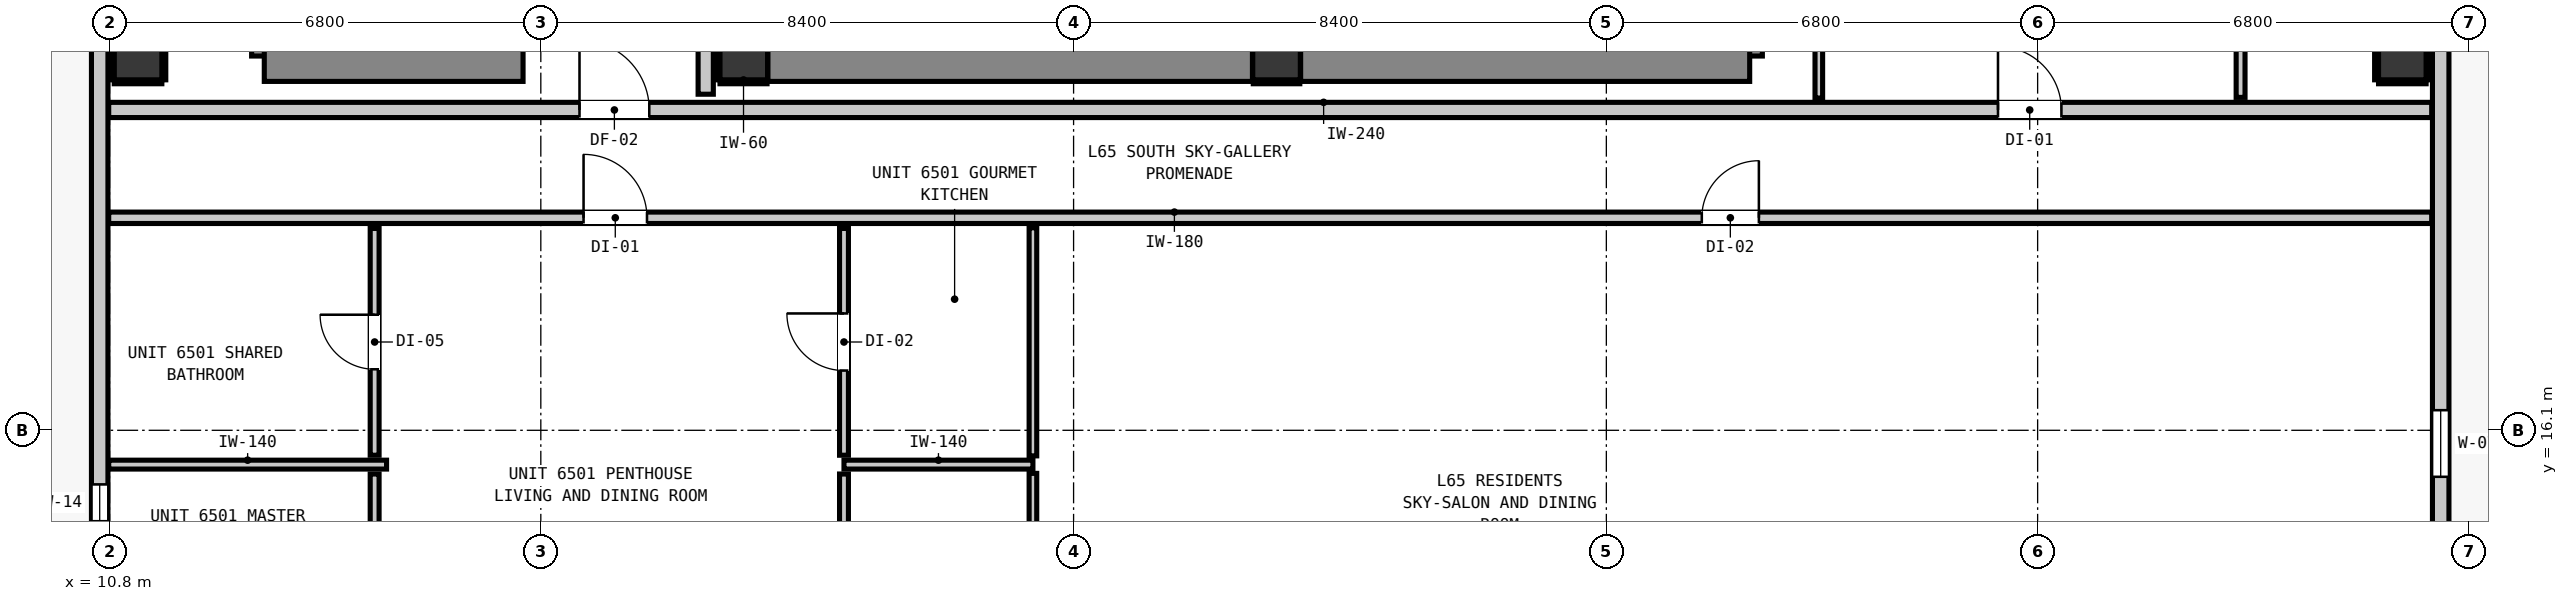
"""IFC4 building model, lengths in metres.
Left out: names, types, materials, properties, quantities, classifications, styles, units other than length and angle.
Written with IfcOpenShell. Run it as: python <this file> out.ifc"""

import sys

from ifc_helpers import new_model, si_unit, direction, frame, frame_2d, origin, origin_2d, place, context, subcontext, project, spatial, rectangle, extrude, element, fill, save


model = new_model("IFC4")
c1 = context("Model", 3, precision=1e-05, world=origin(), true_north=direction((0.0, 1.0)))
c2 = subcontext(c1, "Body", "Model", "MODEL_VIEW")
j1 = project(units=[si_unit("LENGTHUNIT", "METRE"), si_unit("PLANEANGLEUNIT", "RADIAN")], contexts=[c1])
p1 = place(None, origin())
s1 = spatial("IfcSite", under=j1, at=p1, CompositionType="ELEMENT")
p2 = place(p1, origin())
s2 = spatial("IfcBuilding", under=s1, at=p2, CompositionType="ELEMENT")
p3 = place(p2, frame((0.0, 0.0, 223.36)))
s3 = spatial("IfcBuildingStorey", under=s2, at=p3, CompositionType="ELEMENT", Elevation=223.36)
for number, where, z_axis, x_axis in (
    (1, (20.8, 22.0, 0.0), (0.0, 0.0, 1.0), (1.0, 0.0, 0.0)),
    (2, (29.2, 22.0, 0.0), (0.0, 0.0, 1.0), (1.0, 0.0, 0.0)),
):
    element("IfcColumn", number, at=place(p3, frame(where, z_axis=z_axis, x_axis=x_axis)), inside=s3, PredefinedType="COLUMN", context=c2, shape_type="SweptSolid", body=[
        extrude(rectangle(XDim=0.75, YDim=0.75, at=origin_2d()), origin(), (0.0, 0.0, 1.0), 3.32),
    ])
p4 = place(p3, frame((13.44, 22.0, 0.0), z_axis=(0.0, 0.0, 1.0), x_axis=(0.0, 1.0, 0.0)))
e3 = element("IfcWall", 3, at=p4, inside=s3, PredefinedType="SHEAR", context=c2, shape_type="SweptSolid", body=[
    extrude(rectangle(XDim=8.32, YDim=0.8, at=frame_2d((4.16, 0.0))), origin(), (0.0, 0.0, 1.0), 3.32),
])
p5 = place(p3, frame((13.24, 22.0, 0.0), z_axis=(0.0, 0.0, 1.0), x_axis=(1.0, 0.0, 0.0)))
e4 = element("IfcWall", 4, at=p5, inside=s3, PredefinedType="SHEAR", context=c2, shape_type="SweptSolid", body=[
    extrude(rectangle(XDim=4.08, YDim=0.8, at=frame_2d((2.04, 0.0))), origin(), (0.0, 0.0, 1.0), 3.32),
])
p6 = place(p3, frame((36.46, 22.0, 0.0), z_axis=(0.0, 0.0, 1.0), x_axis=(0.0, 1.0, 0.0)))
e5 = element("IfcWall", 5, at=p6, inside=s3, PredefinedType="SHEAR", context=c2, shape_type="SweptSolid", body=[
    extrude(rectangle(XDim=8.32, YDim=0.8, at=frame_2d((4.16, 0.0))), origin(), (0.0, 0.0, 1.0), 3.32),
])
p7 = place(p3, frame((29.58, 22.0, 0.0), z_axis=(0.0, 0.0, 1.0), x_axis=(1.0, 0.0, 0.0)))
e6 = element("IfcWall", 6, at=p7, inside=s3, PredefinedType="SHEAR", context=c2, shape_type="SweptSolid", body=[
    extrude(rectangle(XDim=7.08, YDim=0.8, at=frame_2d((3.54, 0.0))), origin(), (0.0, 0.0, 1.0), 3.32),
])
p8 = place(p3, frame((21.18, 22.0, 0.0), z_axis=(0.0, 0.0, 1.0), x_axis=(1.0, 0.0, 0.0)))
e7 = element("IfcWall", 7, at=p8, inside=s3, PredefinedType="SHEAR", context=c2, shape_type="SweptSolid", body=[
    extrude(rectangle(XDim=7.64, YDim=0.8, at=frame_2d((3.82, 0.0))), origin(), (0.0, 0.0, 1.0), 3.32),
])
for number, where, z_axis, x_axis in (
    (8, (11.25, 22.0, 0.0), (0.0, 0.0, 1.0), (1.0, 0.0, 0.0)),
    (9, (46.95, 22.0, 0.0), (0.0, 0.0, 1.0), (1.0, 0.0, 0.0)),
):
    element("IfcColumn", number, at=place(p3, frame(where, z_axis=z_axis, x_axis=x_axis)), inside=s3, PredefinedType="COLUMN", context=c2, shape_type="SweptSolid", body=[
        extrude(rectangle(XDim=0.75, YDim=0.75, at=origin_2d()), origin(), (0.0, 0.0, 1.0), 3.32),
    ])
p9 = place(p3, frame((10.645, 12.345, 0.0), z_axis=(0.0, 0.0, 1.0), x_axis=(0.0, 1.0, 0.0)))
e10 = element("IfcWall", 10, at=p9, inside=s3, PredefinedType="STANDARD", context=c2, shape_type="SweptSolid", body=[
    extrude(rectangle(XDim=30.31, YDim=0.26, at=frame_2d((15.155, 0.0))), origin(), (0.0, 0.0, 1.0), 2.92),
])
p10 = place(p9, frame((0.91, 0.0, 0.0)))
e11 = element("IfcOpeningElement", 11, at=p10, cuts=e10, PredefinedType="OPENING", context=c2, shape_type="SweptSolid", body=[
    extrude(rectangle(XDim=1.0, YDim=2.15, at=frame_2d((0.5, 1.075))), frame((0.0, 0.14, 0.0), z_axis=(0.0, -1.0, 0.0), x_axis=(1.0, 0.0, 0.0)), (0.0, 0.0, 1.0), 0.28),
])
p11 = place(p9, frame((2.322, 0.0, 0.85)))
e12 = element("IfcOpeningElement", 12, at=p11, cuts=e10, PredefinedType="OPENING", context=c2, shape_type="SweptSolid", body=[
    extrude(rectangle(XDim=0.58, YDim=1.5, at=frame_2d((0.29, 0.75))), frame((0.0, 0.14, 0.0), z_axis=(0.0, -1.0, 0.0), x_axis=(1.0, 0.0, 0.0)), (0.0, 0.0, 1.0), 0.28),
])
p12 = place(p3, frame((47.555, 42.655, 0.0), z_axis=(0.0, 0.0, 1.0), x_axis=(0.0, -1.0, 0.0)))
e13 = element("IfcWall", 13, at=p12, inside=s3, PredefinedType="STANDARD", context=c2, shape_type="SweptSolid", body=[
    extrude(rectangle(XDim=30.31, YDim=0.26, at=frame_2d((15.155, 0.0))), origin(), (0.0, 0.0, 1.0), 2.92),
])
p13 = place(p12, frame((4.082, 0.0, 0.0)))
e14 = element("IfcOpeningElement", 14, at=p13, cuts=e13, PredefinedType="OPENING", context=c2, shape_type="SweptSolid", body=[
    extrude(rectangle(XDim=1.0, YDim=2.15, at=frame_2d((0.5, 1.075))), frame((0.0, 0.14, 0.0), z_axis=(0.0, -1.0, 0.0), x_axis=(1.0, 0.0, 0.0)), (0.0, 0.0, 1.0), 0.28),
])
p14 = place(p12, frame((26.238, 0.0, 0.85)))
e15 = element("IfcOpeningElement", 15, at=p14, cuts=e13, PredefinedType="OPENING", context=c2, shape_type="SweptSolid", body=[
    extrude(rectangle(XDim=1.05, YDim=1.65, at=frame_2d((0.525, 0.825))), frame((0.0, 0.14, 0.0), z_axis=(0.0, -1.0, 0.0), x_axis=(1.0, 0.0, 0.0)), (0.0, 0.0, 1.0), 0.28),
])
p15 = place(p3, frame((10.787, 21.15, 0.0), z_axis=(0.0, 0.0, 1.0), x_axis=(1.0, 0.0, 0.0)))
e16 = element("IfcWall", 16, at=p15, inside=s3, PredefinedType="PARTITIONING", context=c2, shape_type="SweptSolid", body=[
    extrude(rectangle(XDim=36.626, YDim=0.24, at=frame_2d((18.313, 0.0))), origin(), (0.0, 0.0, 1.0), 2.92),
])
p16 = place(p15, frame((7.423, 0.0, 0.0)))
e17 = element("IfcOpeningElement", 17, at=p16, cuts=e16, PredefinedType="OPENING", context=c2, shape_type="SweptSolid", body=[
    extrude(rectangle(XDim=1.1, YDim=2.15, at=frame_2d((0.55, 1.075))), frame((0.0, 0.13, 0.0), z_axis=(0.0, -1.0, 0.0), x_axis=(1.0, 0.0, 0.0)), (0.0, 0.0, 1.0), 0.26),
])
p17 = place(p15, frame((29.788, 0.0, 0.0)))
e18 = element("IfcOpeningElement", 18, at=p17, cuts=e16, PredefinedType="OPENING", context=c2, shape_type="SweptSolid", body=[
    extrude(rectangle(XDim=1.0, YDim=2.15, at=frame_2d((0.5, 1.075))), frame((0.0, 0.13, 0.0), z_axis=(0.0, -1.0, 0.0), x_axis=(1.0, 0.0, 0.0)), (0.0, 0.0, 1.0), 0.26),
])
p18 = place(p3, frame((10.787, 19.45, 0.0), z_axis=(0.0, 0.0, 1.0), x_axis=(1.0, 0.0, 0.0)))
e19 = element("IfcWall", 19, at=p18, inside=s3, PredefinedType="PARTITIONING", context=c2, shape_type="SweptSolid", body=[
    extrude(rectangle(XDim=36.626, YDim=0.18, at=frame_2d((18.313, 0.0))), origin(), (0.0, 0.0, 1.0), 2.92),
])
p19 = place(p18, frame((7.487, 0.0, 0.0)))
e20 = element("IfcOpeningElement", 20, at=p19, cuts=e19, PredefinedType="OPENING", context=c2, shape_type="SweptSolid", body=[
    extrude(rectangle(XDim=1.0, YDim=2.15, at=frame_2d((0.5, 1.075))), frame((0.0, 0.1, 0.0), z_axis=(0.0, -1.0, 0.0), x_axis=(1.0, 0.0, 0.0)), (0.0, 0.0, 1.0), 0.2),
])
p20 = place(p18, frame((25.118, 0.0, 0.0)))
e21 = element("IfcOpeningElement", 21, at=p20, cuts=e19, PredefinedType="OPENING", context=c2, shape_type="SweptSolid", body=[
    extrude(rectangle(XDim=0.9, YDim=2.1, at=frame_2d((0.45, 1.05))), frame((0.0, 0.1, 0.0), z_axis=(0.0, -1.0, 0.0), x_axis=(1.0, 0.0, 0.0)), (0.0, 0.0, 1.0), 0.2),
])
p21 = place(p3, frame((10.787, 15.559, 0.0), z_axis=(0.0, 0.0, 1.0), x_axis=(1.0, 0.0, 0.0)))
e22 = element("IfcWall", 22, at=p21, inside=s3, PredefinedType="PARTITIONING", context=c2, shape_type="SweptSolid", body=[
    extrude(rectangle(XDim=4.381, YDim=0.14, at=frame_2d((2.19, 0.0))), origin(), (0.0, 0.0, 1.0), 2.92),
])
p22 = place(p3, frame((22.38, 15.559, 0.0), z_axis=(0.0, 0.0, 1.0), x_axis=(1.0, 0.0, 0.0)))
e23 = element("IfcWall", 23, at=p22, inside=s3, PredefinedType="PARTITIONING", context=c2, shape_type="SweptSolid", body=[
    extrude(rectangle(XDim=2.979, YDim=0.14, at=frame_2d((1.49, 0.0))), origin(), (0.0, 0.0, 1.0), 2.92),
])
p23 = place(p3, frame((20.2, 21.398, 0.0), z_axis=(0.0, 0.0, 1.0), x_axis=(0.0, 1.0, 0.0)))
e24 = element("IfcWall", 24, at=p23, inside=s3, PredefinedType="PARTITIONING", context=c2, shape_type="SweptSolid", body=[
    extrude(rectangle(XDim=6.754, YDim=0.24, at=frame_2d((3.377, 0.0))), origin(), (0.0, 0.0, 1.0), 2.92),
])
p24 = place(p3, frame((14.98, 10.387, 0.0), z_axis=(0.0, 0.0, 1.0), x_axis=(0.0, 1.0, 0.0)))
e25 = element("IfcWall", 25, at=p24, inside=s3, PredefinedType="PARTITIONING", context=c2, shape_type="SweptSolid", body=[
    extrude(rectangle(XDim=5.024, YDim=0.14, at=frame_2d((2.512, 0.0))), origin(), (0.0, 0.0, 1.0), 2.92),
])
p25 = place(p24, frame((2.155, 0.0, 0.0)))
e26 = element("IfcOpeningElement", 26, at=p25, cuts=e25, PredefinedType="OPENING", context=c2, shape_type="SweptSolid", body=[
    extrude(rectangle(XDim=0.9, YDim=2.1, at=frame_2d((0.45, 1.05))), frame((0.0, 0.08, 0.0), z_axis=(0.0, -1.0, 0.0), x_axis=(1.0, 0.0, 0.0)), (0.0, 0.0, 1.0), 0.16),
])
p26 = place(p3, frame((14.98, 15.707, 0.0), z_axis=(0.0, 0.0, 1.0), x_axis=(0.0, 1.0, 0.0)))
e27 = element("IfcWall", 27, at=p26, inside=s3, PredefinedType="PARTITIONING", context=c2, shape_type="SweptSolid", body=[
    extrude(rectangle(XDim=3.575, YDim=0.14, at=frame_2d((1.788, 0.0))), origin(), (0.0, 0.0, 1.0), 2.92),
])
p27 = place(p26, frame((1.355, 0.0, 0.0)))
e28 = element("IfcOpeningElement", 28, at=p27, cuts=e27, PredefinedType="OPENING", context=c2, shape_type="SweptSolid", body=[
    extrude(rectangle(XDim=0.86, YDim=2.02, at=frame_2d((0.43, 1.01))), frame((0.0, 0.08, 0.0), z_axis=(0.0, -1.0, 0.0), x_axis=(1.0, 0.0, 0.0)), (0.0, 0.0, 1.0), 0.16),
])
p28 = place(p3, frame((22.38, 10.387, 0.0), z_axis=(0.0, 0.0, 1.0), x_axis=(0.0, 1.0, 0.0)))
e29 = element("IfcWall", 29, at=p28, inside=s3, PredefinedType="PARTITIONING", context=c2, shape_type="SweptSolid", body=[
    extrude(rectangle(XDim=5.024, YDim=0.14, at=frame_2d((2.512, 0.0))), origin(), (0.0, 0.0, 1.0), 2.92),
])
p29 = place(p28, frame((2.155, 0.0, 0.0)))
e30 = element("IfcOpeningElement", 30, at=p29, cuts=e29, PredefinedType="OPENING", context=c2, shape_type="SweptSolid", body=[
    extrude(rectangle(XDim=0.9, YDim=2.1, at=frame_2d((0.45, 1.05))), frame((0.0, 0.08, 0.0), z_axis=(0.0, -1.0, 0.0), x_axis=(1.0, 0.0, 0.0)), (0.0, 0.0, 1.0), 0.16),
])
p30 = place(p3, frame((22.38, 15.707, 0.0), z_axis=(0.0, 0.0, 1.0), x_axis=(0.0, 1.0, 0.0)))
e31 = element("IfcWall", 31, at=p30, inside=s3, PredefinedType="PARTITIONING", context=c2, shape_type="SweptSolid", body=[
    extrude(rectangle(XDim=3.575, YDim=0.14, at=frame_2d((1.788, 0.0))), origin(), (0.0, 0.0, 1.0), 2.92),
])
p31 = place(p30, frame((1.335, 0.0, 0.0)))
e32 = element("IfcOpeningElement", 32, at=p31, cuts=e31, PredefinedType="OPENING", context=c2, shape_type="SweptSolid", body=[
    extrude(rectangle(XDim=0.9, YDim=2.1, at=frame_2d((0.45, 1.05))), frame((0.0, 0.08, 0.0), z_axis=(0.0, -1.0, 0.0), x_axis=(1.0, 0.0, 0.0)), (0.0, 0.0, 1.0), 0.16),
])
p32 = place(p3, frame((44.4, 21.348, 0.0), z_axis=(0.0, 0.0, 1.0), x_axis=(0.0, 1.0, 0.0)))
e33 = element("IfcWall", 33, at=p32, inside=s3, PredefinedType="PARTITIONING", context=c2, shape_type="SweptSolid", body=[
    extrude(rectangle(XDim=5.304, YDim=0.14, at=frame_2d((2.652, 0.0))), origin(), (0.0, 0.0, 1.0), 2.92),
])
p33 = place(p32, frame((2.19, 0.0, 0.0)))
e34 = element("IfcOpeningElement", 34, at=p33, cuts=e33, PredefinedType="OPENING", context=c2, shape_type="SweptSolid", body=[
    extrude(rectangle(XDim=0.9, YDim=2.1, at=frame_2d((0.45, 1.05))), frame((0.0, 0.08, 0.0), z_axis=(0.0, -1.0, 0.0), x_axis=(1.0, 0.0, 0.0)), (0.0, 0.0, 1.0), 0.16),
])
p34 = place(p3, frame((25.359, 10.387, 0.0), z_axis=(0.0, 0.0, 1.0), x_axis=(0.0, 1.0, 0.0)))
e35 = element("IfcWall", 35, at=p34, inside=s3, PredefinedType="PARTITIONING", context=c2, shape_type="SweptSolid", body=[
    extrude(rectangle(XDim=5.034, YDim=0.12, at=frame_2d((2.517, 0.0))), origin(), (0.0, 0.0, 1.0), 2.92),
])
p35 = place(p3, frame((25.359, 15.697, 0.0), z_axis=(0.0, 0.0, 1.0), x_axis=(0.0, 1.0, 0.0)))
e36 = element("IfcWall", 36, at=p35, inside=s3, PredefinedType="PARTITIONING", context=c2, shape_type="SweptSolid", body=[
    extrude(rectangle(XDim=3.595, YDim=0.12, at=frame_2d((1.797, 0.0))), origin(), (0.0, 0.0, 1.0), 2.92),
])
p36 = place(p3, frame((37.75, 21.338, 0.0), z_axis=(0.0, 0.0, 1.0), x_axis=(0.0, 1.0, 0.0)))
e37 = element("IfcWall", 37, at=p36, inside=s3, PredefinedType="PARTITIONING", context=c2, shape_type="SweptSolid", body=[
    extrude(rectangle(XDim=10.524, YDim=0.12, at=frame_2d((5.262, 0.0))), origin(), (0.0, 0.0, 1.0), 2.92),
])
p37 = place(p3, frame((20.425, 21.593, 0.0), z_axis=(0.0, 0.0, 1.0), x_axis=(1.0, 0.0, 0.0)))
e38 = element("IfcWall", 38, at=p37, inside=s3, PredefinedType="PARTITIONING", context=c2, shape_type="SweptSolid", body=[
    extrude(rectangle(XDim=0.742, YDim=0.06, at=frame_2d((0.371, 0.0))), origin(), (0.0, 0.0, 1.0), 1.45),
])
p38 = place(p3, frame((20.393, 21.625, 0.0), z_axis=(0.0, 0.0, 1.0), x_axis=(0.0, 1.0, 0.0)))
e39 = element("IfcWall", 39, at=p38, inside=s3, PredefinedType="PARTITIONING", context=c2, shape_type="SweptSolid", body=[
    extrude(rectangle(XDim=0.75, YDim=0.06, at=frame_2d((0.375, 0.0))), origin(), (0.0, 0.0, 1.0), 1.45),
])
p39 = place(p3, frame((28.833, 21.593, 0.0), z_axis=(0.0, 0.0, 1.0), x_axis=(1.0, 0.0, 0.0)))
e40 = element("IfcWall", 40, at=p39, inside=s3, PredefinedType="PARTITIONING", context=c2, shape_type="SweptSolid", body=[
    extrude(rectangle(XDim=0.734, YDim=0.06, at=frame_2d((0.367, 0.0))), origin(), (0.0, 0.0, 1.0), 1.45),
])
for number, where, z_axis, x_axis in (
    (41, (10.875, 21.593, 0.0), (0.0, 0.0, 1.0), (1.0, 0.0, 0.0)),
    (42, (10.843, 21.625, 0.0), (0.0, 0.0, 1.0), (0.0, 1.0, 0.0)),
    (43, (11.657, 21.625, 0.0), (0.0, 0.0, 1.0), (0.0, 1.0, 0.0)),
    (44, (46.575, 21.593, 0.0), (0.0, 0.0, 1.0), (1.0, 0.0, 0.0)),
    (45, (46.543, 21.625, 0.0), (0.0, 0.0, 1.0), (0.0, 1.0, 0.0)),
    (46, (47.357, 21.625, 0.0), (0.0, 0.0, 1.0), (0.0, 1.0, 0.0)),
):
    element("IfcWall", number, at=place(p3, frame(where, z_axis=z_axis, x_axis=x_axis)), inside=s3, PredefinedType="PARTITIONING", context=c2, shape_type="SweptSolid", body=[
        extrude(rectangle(XDim=0.75, YDim=0.06, at=frame_2d((0.375, 0.0))), origin(), (0.0, 0.0, 1.0), 1.45),
    ])
p40 = place(p11, origin())
e47 = element("IfcWindow", 47, at=p40, inside=s3, PartitioningType="SINGLE_PANEL", PredefinedType="WINDOW", context=c2, shape_type="SweptSolid", body=[
    extrude(rectangle(XDim=0.58, YDim=1.5, at=frame_2d((0.29, 0.75))), frame((0.0, 0.03, 0.0), z_axis=(0.0, -1.0, 0.0), x_axis=(1.0, 0.0, 0.0)), (0.0, 0.0, 1.0), 0.06),
])
fill(e12, e47)
p41 = place(p14, origin())
e48 = element("IfcWindow", 48, at=p41, inside=s3, PartitioningType="SINGLE_PANEL", PredefinedType="WINDOW", context=c2, shape_type="SweptSolid", body=[
    extrude(rectangle(XDim=1.05, YDim=1.65, at=frame_2d((0.525, 0.825))), frame((0.0, 0.03, 0.0), z_axis=(0.0, -1.0, 0.0), x_axis=(1.0, 0.0, 0.0)), (0.0, 0.0, 1.0), 0.06),
])
fill(e15, e48)
p42 = place(p16, origin())
e49 = element("IfcDoor", 49, at=p42, inside=s3, OperationType="SINGLE_SWING_LEFT", PredefinedType="DOOR", context=c2, shape_type="SweptSolid", body=[
    extrude(rectangle(XDim=1.1, YDim=2.15, at=frame_2d((0.55, 1.075))), frame((0.0, 0.025, 0.0), z_axis=(0.0, -1.0, 0.0), x_axis=(1.0, 0.0, 0.0)), (0.0, 0.0, 1.0), 0.05),
])
fill(e17, e49)
p43 = place(p19, origin())
e50 = element("IfcDoor", 50, at=p43, inside=s3, OperationType="SINGLE_SWING_LEFT", PredefinedType="DOOR", context=c2, shape_type="SweptSolid", body=[
    extrude(rectangle(XDim=1.0, YDim=2.15, at=frame_2d((0.5, 1.075))), frame((0.0, 0.025, 0.0), z_axis=(0.0, -1.0, 0.0), x_axis=(1.0, 0.0, 0.0)), (0.0, 0.0, 1.0), 0.05),
])
fill(e20, e50)
p44 = place(p27, origin())
e51 = element("IfcDoor", 51, at=p44, inside=s3, OperationType="SINGLE_SWING_RIGHT", PredefinedType="DOOR", context=c2, shape_type="SweptSolid", body=[
    extrude(rectangle(XDim=0.86, YDim=2.02, at=frame_2d((0.43, 1.01))), frame((0.0, 0.025, 0.0), z_axis=(0.0, -1.0, 0.0), x_axis=(1.0, 0.0, 0.0)), (0.0, 0.0, 1.0), 0.05),
])
fill(e28, e51)
p45 = place(p31, origin())
e52 = element("IfcDoor", 52, at=p45, inside=s3, OperationType="SINGLE_SWING_RIGHT", PredefinedType="DOOR", context=c2, shape_type="SweptSolid", body=[
    extrude(rectangle(XDim=0.9, YDim=2.1, at=frame_2d((0.45, 1.05))), frame((0.0, 0.025, 0.0), z_axis=(0.0, -1.0, 0.0), x_axis=(1.0, 0.0, 0.0)), (0.0, 0.0, 1.0), 0.05),
])
fill(e32, e52)
p46 = place(p20, origin())
e53 = element("IfcDoor", 53, at=p46, inside=s3, OperationType="SINGLE_SWING_RIGHT", PredefinedType="DOOR", context=c2, shape_type="SweptSolid", body=[
    extrude(rectangle(XDim=0.9, YDim=2.1, at=frame_2d((0.45, 1.05))), frame((0.0, 0.025, 0.0), z_axis=(0.0, -1.0, 0.0), x_axis=(1.0, 0.0, 0.0)), (0.0, 0.0, 1.0), 0.05),
])
fill(e21, e53)
p47 = place(p17, origin())
e54 = element("IfcDoor", 54, at=p47, inside=s3, OperationType="SINGLE_SWING_LEFT", PredefinedType="DOOR", context=c2, shape_type="SweptSolid", body=[
    extrude(rectangle(XDim=1.0, YDim=2.15, at=frame_2d((0.5, 1.075))), frame((0.0, 0.025, 0.0), z_axis=(0.0, -1.0, 0.0), x_axis=(1.0, 0.0, 0.0)), (0.0, 0.0, 1.0), 0.05),
])
fill(e18, e54)
save(model, sys.argv[1])
